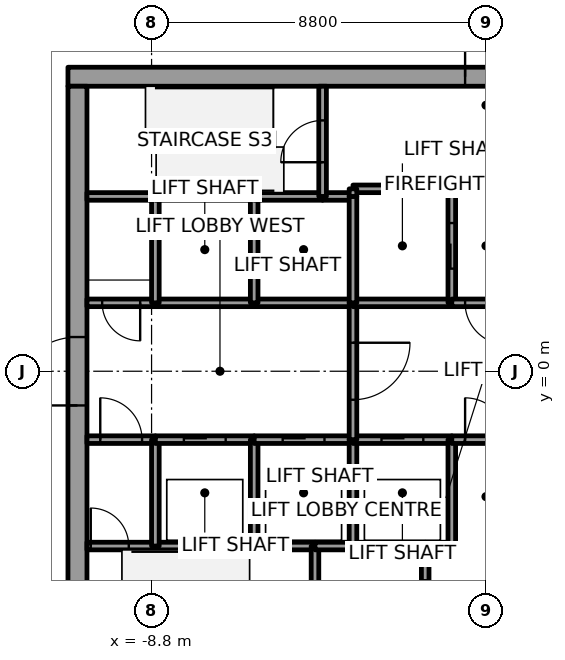
"""IFC4 building model, lengths in metres.
Left out: names, types, materials, properties, quantities, classifications, styles, units other than length and angle.
Written with IfcOpenShell. Run it as: python <this file> out.ifc"""

import sys

from ifc_helpers import new_model, si_unit, direction, frame, frame_2d, origin, place, context, subcontext, project, spatial, rectangle, extrude, element, fill, save


model = new_model("IFC4")
c1 = context("Model", 3, precision=1e-05, world=origin(), true_north=direction((0.0, 1.0)))
c2 = subcontext(c1, "Body", "Model", "MODEL_VIEW")
j1 = project(units=[si_unit("LENGTHUNIT", "METRE"), si_unit("PLANEANGLEUNIT", "RADIAN")], contexts=[c1])
p1 = place(None, origin())
s1 = spatial("IfcSite", under=j1, at=p1, CompositionType="ELEMENT")
p2 = place(p1, origin())
s2 = spatial("IfcBuilding", under=s1, at=p2, CompositionType="ELEMENT")
p3 = place(p2, frame((0.0, 0.0, 141.8)))
s3 = spatial("IfcBuildingStorey", under=s2, at=p3, CompositionType="ELEMENT", Elevation=141.8)
p4 = place(p3, frame((-11.0, 7.75, 0.0), z_axis=(0.0, 0.0, 1.0), x_axis=(1.0, 0.0, 0.0)))
e1 = element("IfcWall", 1, at=p4, inside=s3, PredefinedType="SHEAR", context=c2, shape_type="SweptSolid", body=[
    extrude(rectangle(XDim=22.0, YDim=0.5, at=frame_2d((11.0, 0.0))), origin(), (0.0, 0.0, 1.0), 4.0),
])
p5 = place(p4, frame((10.45, 0.0, 0.0)))
e2 = element("IfcOpeningElement", 2, at=p5, cuts=e1, PredefinedType="OPENING", context=c2, shape_type="SweptSolid", body=[
    extrude(rectangle(XDim=1.1, YDim=2.1, at=frame_2d((0.55, 1.05))), frame((0.0, 0.25, 0.0), z_axis=(0.0, -1.0, 0.0), x_axis=(1.0, 0.0, 0.0)), (0.0, 0.0, 1.0), 0.5),
])
p6 = place(p3, frame((-10.75, -7.5, 0.0), z_axis=(0.0, 0.0, 1.0), x_axis=(0.0, 1.0, 0.0)))
e3 = element("IfcWall", 3, at=p6, inside=s3, PredefinedType="SHEAR", context=c2, shape_type="SweptSolid", body=[
    extrude(rectangle(XDim=15.0, YDim=0.5, at=frame_2d((7.5, 0.0))), origin(), (0.0, 0.0, 1.0), 4.0),
])
p7 = place(p6, frame((6.6, 0.0, 0.0)))
e4 = element("IfcOpeningElement", 4, at=p7, cuts=e3, PredefinedType="OPENING", context=c2, shape_type="SweptSolid", body=[
    extrude(rectangle(XDim=1.8, YDim=2.1, at=frame_2d((0.9, 1.05))), frame((0.0, 0.25, 0.0), z_axis=(0.0, -1.0, 0.0), x_axis=(1.0, 0.0, 0.0)), (0.0, 0.0, 1.0), 0.5),
])
p8 = place(p3, frame((-10.5, -4.6, 0.0), z_axis=(0.0, 0.0, 1.0), x_axis=(1.0, 0.0, 0.0)))
e5 = element("IfcWall", 5, at=p8, inside=s3, PredefinedType="SOLIDWALL", context=c2, shape_type="SweptSolid", body=[
    extrude(rectangle(XDim=1.8, YDim=0.2, at=frame_2d((0.9, 0.0))), origin(), (0.0, 0.0, 1.0), 3.85),
])
p9 = place(p8, frame((0.1, 0.0, 0.0)))
e6 = element("IfcOpeningElement", 6, at=p9, cuts=e5, PredefinedType="OPENING", context=c2, shape_type="SweptSolid", body=[
    extrude(rectangle(XDim=1.0, YDim=2.1, at=frame_2d((0.5, 1.05))), frame((0.0, 0.1, 0.0), z_axis=(0.0, -1.0, 0.0), x_axis=(1.0, 0.0, 0.0)), (0.0, 0.0, 1.0), 0.2),
])
p10 = place(p3, frame((-10.5, -1.8, 0.0), z_axis=(0.0, 0.0, 1.0), x_axis=(1.0, 0.0, 0.0)))
e7 = element("IfcWall", 7, at=p10, inside=s3, PredefinedType="SOLIDWALL", context=c2, shape_type="SweptSolid", body=[
    extrude(rectangle(XDim=1.8, YDim=0.2, at=frame_2d((0.9, 0.0))), origin(), (0.0, 0.0, 1.0), 3.85),
])
p11 = place(p10, frame((0.35, 0.0, 0.0)))
e8 = element("IfcOpeningElement", 8, at=p11, cuts=e7, PredefinedType="OPENING", context=c2, shape_type="SweptSolid", body=[
    extrude(rectangle(XDim=1.1, YDim=2.1, at=frame_2d((0.55, 1.05))), frame((0.0, 0.1, 0.0), z_axis=(0.0, -1.0, 0.0), x_axis=(1.0, 0.0, 0.0)), (0.0, 0.0, 1.0), 0.2),
])
p12 = place(p3, frame((-8.7, 1.8, 0.0), z_axis=(0.0, 0.0, 1.0), x_axis=(-1.0, 0.0, 0.0)))
e9 = element("IfcWall", 9, at=p12, inside=s3, PredefinedType="SOLIDWALL", context=c2, shape_type="SweptSolid", body=[
    extrude(rectangle(XDim=1.8, YDim=0.2, at=frame_2d((0.9, 0.0))), origin(), (0.0, 0.0, 1.0), 3.85),
])
p13 = place(p12, frame((0.4, 0.0, 0.0)))
e10 = element("IfcOpeningElement", 10, at=p13, cuts=e9, PredefinedType="OPENING", context=c2, shape_type="SweptSolid", body=[
    extrude(rectangle(XDim=1.0, YDim=2.1, at=frame_2d((0.5, 1.05))), frame((0.0, 0.1, 0.0), z_axis=(0.0, -1.0, 0.0), x_axis=(1.0, 0.0, 0.0)), (0.0, 0.0, 1.0), 0.2),
])
p14 = place(p3, frame((-8.7, 4.6, 0.0), z_axis=(0.0, 0.0, 1.0), x_axis=(-1.0, 0.0, 0.0)))
e11 = element("IfcWall", 11, at=p14, inside=s3, PredefinedType="SOLIDWALL", context=c2, shape_type="SweptSolid", body=[
    extrude(rectangle(XDim=1.8, YDim=0.2, at=frame_2d((0.9, 0.0))), origin(), (0.0, 0.0, 1.0), 3.85),
])
p15 = place(p3, frame((-8.7, -4.6, 0.0), z_axis=(0.0, 0.0, 1.0), x_axis=(1.0, 0.0, 0.0)))
e12 = element("IfcWall", 12, at=p15, inside=s3, PredefinedType="SOLIDWALL", context=c2, shape_type="SweptSolid", body=[
    extrude(rectangle(XDim=2.6, YDim=0.2, at=frame_2d((1.3, 0.0))), origin(), (0.0, 0.0, 1.0), 3.85),
])
p16 = place(p3, frame((-8.7, -4.6, 0.0), z_axis=(0.0, 0.0, 1.0), x_axis=(0.0, 1.0, 0.0)))
e13 = element("IfcWall", 13, at=p16, inside=s3, PredefinedType="SOLIDWALL", context=c2, shape_type="SweptSolid", body=[
    extrude(rectangle(XDim=2.8, YDim=0.2, at=frame_2d((1.4, 0.0))), origin(), (0.0, 0.0, 1.0), 3.85),
])
p17 = place(p3, frame((-8.7, -1.8, 0.0), z_axis=(0.0, 0.0, 1.0), x_axis=(1.0, 0.0, 0.0)))
e14 = element("IfcWall", 14, at=p17, inside=s3, PredefinedType="SOLIDWALL", context=c2, shape_type="SweptSolid", body=[
    extrude(rectangle(XDim=2.6, YDim=0.2, at=frame_2d((1.3, 0.0))), origin(), (0.0, 0.0, 1.0), 3.85),
])
p18 = place(p17, frame((0.75, 0.0, 0.0)))
e15 = element("IfcOpeningElement", 15, at=p18, cuts=e14, PredefinedType="OPENING", context=c2, shape_type="SweptSolid", body=[
    extrude(rectangle(XDim=1.1, YDim=2.1, at=frame_2d((0.55, 1.05))), frame((0.0, 0.1, 0.0), z_axis=(0.0, -1.0, 0.0), x_axis=(1.0, 0.0, 0.0)), (0.0, 0.0, 1.0), 0.2),
])
p19 = place(p3, frame((-6.1, 1.8, 0.0), z_axis=(0.0, 0.0, 1.0), x_axis=(-1.0, 0.0, 0.0)))
e16 = element("IfcWall", 16, at=p19, inside=s3, PredefinedType="SOLIDWALL", context=c2, shape_type="SweptSolid", body=[
    extrude(rectangle(XDim=2.6, YDim=0.2, at=frame_2d((1.3, 0.0))), origin(), (0.0, 0.0, 1.0), 3.85),
])
p20 = place(p3, frame((-8.7, 1.8, 0.0), z_axis=(0.0, 0.0, 1.0), x_axis=(0.0, 1.0, 0.0)))
e17 = element("IfcWall", 17, at=p20, inside=s3, PredefinedType="SOLIDWALL", context=c2, shape_type="SweptSolid", body=[
    extrude(rectangle(XDim=2.8, YDim=0.2, at=frame_2d((1.4, 0.0))), origin(), (0.0, 0.0, 1.0), 3.85),
])
p21 = place(p3, frame((-6.1, 4.6, 0.0), z_axis=(0.0, 0.0, 1.0), x_axis=(-1.0, 0.0, 0.0)))
e18 = element("IfcWall", 18, at=p21, inside=s3, PredefinedType="SOLIDWALL", context=c2, shape_type="SweptSolid", body=[
    extrude(rectangle(XDim=2.6, YDim=0.2, at=frame_2d((1.3, 0.0))), origin(), (0.0, 0.0, 1.0), 3.85),
])
p22 = place(p3, frame((-6.1, -4.6, 0.0), z_axis=(0.0, 0.0, 1.0), x_axis=(1.0, 0.0, 0.0)))
e19 = element("IfcWall", 19, at=p22, inside=s3, PredefinedType="SOLIDWALL", context=c2, shape_type="SweptSolid", body=[
    extrude(rectangle(XDim=1.6, YDim=0.2, at=frame_2d((0.8, 0.0))), origin(), (0.0, 0.0, 1.0), 3.85),
])
p23 = place(p3, frame((-6.1, -4.6, 0.0), z_axis=(0.0, 0.0, 1.0), x_axis=(0.0, 1.0, 0.0)))
e20 = element("IfcWall", 20, at=p23, inside=s3, PredefinedType="SOLIDWALL", context=c2, shape_type="SweptSolid", body=[
    extrude(rectangle(XDim=2.8, YDim=0.2, at=frame_2d((1.4, 0.0))), origin(), (0.0, 0.0, 1.0), 3.85),
])
p24 = place(p3, frame((-6.1, -1.8, 0.0), z_axis=(0.0, 0.0, 1.0), x_axis=(1.0, 0.0, 0.0)))
e21 = element("IfcWall", 21, at=p24, inside=s3, PredefinedType="SOLIDWALL", context=c2, shape_type="SweptSolid", body=[
    extrude(rectangle(XDim=2.6, YDim=0.2, at=frame_2d((1.3, 0.0))), origin(), (0.0, 0.0, 1.0), 3.85),
])
p25 = place(p24, frame((0.75, 0.0, 0.0)))
e22 = element("IfcOpeningElement", 22, at=p25, cuts=e21, PredefinedType="OPENING", context=c2, shape_type="SweptSolid", body=[
    extrude(rectangle(XDim=1.1, YDim=2.1, at=frame_2d((0.55, 1.05))), frame((0.0, 0.1, 0.0), z_axis=(0.0, -1.0, 0.0), x_axis=(1.0, 0.0, 0.0)), (0.0, 0.0, 1.0), 0.2),
])
p26 = place(p3, frame((-3.5, 1.8, 0.0), z_axis=(0.0, 0.0, 1.0), x_axis=(-1.0, 0.0, 0.0)))
e23 = element("IfcWall", 23, at=p26, inside=s3, PredefinedType="SOLIDWALL", context=c2, shape_type="SweptSolid", body=[
    extrude(rectangle(XDim=2.6, YDim=0.2, at=frame_2d((1.3, 0.0))), origin(), (0.0, 0.0, 1.0), 3.85),
])
p27 = place(p3, frame((-6.1, 1.8, 0.0), z_axis=(0.0, 0.0, 1.0), x_axis=(0.0, 1.0, 0.0)))
e24 = element("IfcWall", 24, at=p27, inside=s3, PredefinedType="SOLIDWALL", context=c2, shape_type="SweptSolid", body=[
    extrude(rectangle(XDim=2.8, YDim=0.2, at=frame_2d((1.4, 0.0))), origin(), (0.0, 0.0, 1.0), 3.85),
])
p28 = place(p3, frame((-4.3, 4.6, 0.0), z_axis=(0.0, 0.0, 1.0), x_axis=(-1.0, 0.0, 0.0)))
e25 = element("IfcWall", 25, at=p28, inside=s3, PredefinedType="SOLIDWALL", context=c2, shape_type="SweptSolid", body=[
    extrude(rectangle(XDim=1.8, YDim=0.2, at=frame_2d((0.9, 0.0))), origin(), (0.0, 0.0, 1.0), 3.85),
])
p29 = place(p3, frame((-4.5, -4.6, 0.0), z_axis=(0.0, 0.0, 1.0), x_axis=(0.0, -1.0, 0.0)))
e26 = element("IfcWall", 26, at=p29, inside=s3, PredefinedType="SOLIDWALL", context=c2, shape_type="SweptSolid", body=[
    extrude(rectangle(XDim=2.9, YDim=0.2, at=frame_2d((1.45, 0.0))), origin(), (0.0, 0.0, 1.0), 3.85),
])
p30 = place(p3, frame((-4.5, -4.6, 0.0), z_axis=(0.0, 0.0, 1.0), x_axis=(1.0, 0.0, 0.0)))
e27 = element("IfcWall", 27, at=p30, inside=s3, PredefinedType="SOLIDWALL", context=c2, shape_type="SweptSolid", body=[
    extrude(rectangle(XDim=1.0, YDim=0.2, at=frame_2d((0.5, 0.0))), origin(), (0.0, 0.0, 1.0), 3.85),
])
p31 = place(p3, frame((-3.5, 4.6, 0.0), z_axis=(0.0, 0.0, 1.0), x_axis=(-1.0, 0.0, 0.0)))
e28 = element("IfcWall", 28, at=p31, inside=s3, PredefinedType="SOLIDWALL", context=c2, shape_type="SweptSolid", body=[
    extrude(rectangle(XDim=0.8, YDim=0.2, at=frame_2d((0.4, 0.0))), origin(), (0.0, 0.0, 1.0), 3.85),
])
p32 = place(p3, frame((-4.3, 4.6, 0.0), z_axis=(0.0, 0.0, 1.0), x_axis=(0.0, 1.0, 0.0)))
e29 = element("IfcWall", 29, at=p32, inside=s3, PredefinedType="SOLIDWALL", context=c2, shape_type="SweptSolid", body=[
    extrude(rectangle(XDim=2.9, YDim=0.2, at=frame_2d((1.45, 0.0))), origin(), (0.0, 0.0, 1.0), 3.85),
])
p33 = place(p32, frame((0.9, 0.0, 0.0)))
e30 = element("IfcOpeningElement", 30, at=p33, cuts=e29, PredefinedType="OPENING", context=c2, shape_type="SweptSolid", body=[
    extrude(rectangle(XDim=1.1, YDim=2.1, at=frame_2d((0.55, 1.05))), frame((0.0, 0.1, 0.0), z_axis=(0.0, -1.0, 0.0), x_axis=(1.0, 0.0, 0.0)), (0.0, 0.0, 1.0), 0.2),
])
p34 = place(p3, frame((-3.5, -4.6, 0.0), z_axis=(0.0, 0.0, 1.0), x_axis=(1.0, 0.0, 0.0)))
e31 = element("IfcWall", 31, at=p34, inside=s3, PredefinedType="SOLIDWALL", context=c2, shape_type="SweptSolid", body=[
    extrude(rectangle(XDim=1.9, YDim=0.2, at=frame_2d((0.95, 0.0))), origin(), (0.0, 0.0, 1.0), 3.85),
])
p35 = place(p3, frame((-3.5, -4.6, 0.0), z_axis=(0.0, 0.0, 1.0), x_axis=(0.0, 1.0, 0.0)))
e32 = element("IfcWall", 32, at=p35, inside=s3, PredefinedType="SOLIDWALL", context=c2, shape_type="SweptSolid", body=[
    extrude(rectangle(XDim=2.8, YDim=0.2, at=frame_2d((1.4, 0.0))), origin(), (0.0, 0.0, 1.0), 3.85),
])
p36 = place(p3, frame((-3.5, -1.8, 0.0), z_axis=(0.0, 0.0, 1.0), x_axis=(1.0, 0.0, 0.0)))
e33 = element("IfcWall", 33, at=p36, inside=s3, PredefinedType="SOLIDWALL", context=c2, shape_type="SweptSolid", body=[
    extrude(rectangle(XDim=2.6, YDim=0.2, at=frame_2d((1.3, 0.0))), origin(), (0.0, 0.0, 1.0), 3.85),
])
p37 = place(p36, frame((0.75, 0.0, 0.0)))
e34 = element("IfcOpeningElement", 34, at=p37, cuts=e33, PredefinedType="OPENING", context=c2, shape_type="SweptSolid", body=[
    extrude(rectangle(XDim=1.1, YDim=2.1, at=frame_2d((0.55, 1.05))), frame((0.0, 0.1, 0.0), z_axis=(0.0, -1.0, 0.0), x_axis=(1.0, 0.0, 0.0)), (0.0, 0.0, 1.0), 0.2),
])
p38 = place(p3, frame((-3.5, 1.8, 0.0), z_axis=(0.0, 0.0, 1.0), x_axis=(0.0, -1.0, 0.0)))
e35 = element("IfcWall", 35, at=p38, inside=s3, PredefinedType="SOLIDWALL", context=c2, shape_type="SweptSolid", body=[
    extrude(rectangle(XDim=3.6, YDim=0.2, at=frame_2d((1.8, 0.0))), origin(), (0.0, 0.0, 1.0), 3.85),
])
p39 = place(p38, frame((1.05, 0.0, 0.0)))
e36 = element("IfcOpeningElement", 36, at=p39, cuts=e35, PredefinedType="OPENING", context=c2, shape_type="SweptSolid", body=[
    extrude(rectangle(XDim=1.5, YDim=2.1, at=frame_2d((0.75, 1.05))), frame((0.0, 0.1, 0.0), z_axis=(0.0, -1.0, 0.0), x_axis=(1.0, 0.0, 0.0)), (0.0, 0.0, 1.0), 0.2),
])
p40 = place(p3, frame((-0.9, 1.8, 0.0), z_axis=(0.0, 0.0, 1.0), x_axis=(-1.0, 0.0, 0.0)))
e37 = element("IfcWall", 37, at=p40, inside=s3, PredefinedType="SOLIDWALL", context=c2, shape_type="SweptSolid", body=[
    extrude(rectangle(XDim=2.6, YDim=0.2, at=frame_2d((1.3, 0.0))), origin(), (0.0, 0.0, 1.0), 3.85),
])
p41 = place(p3, frame((-3.5, 4.6, 0.0), z_axis=(0.0, 0.0, 1.0), x_axis=(0.0, -1.0, 0.0)))
e38 = element("IfcWall", 38, at=p41, inside=s3, PredefinedType="SOLIDWALL", context=c2, shape_type="SweptSolid", body=[
    extrude(rectangle(XDim=2.8, YDim=0.2, at=frame_2d((1.4, 0.0))), origin(), (0.0, 0.0, 1.0), 3.85),
])
p42 = place(p3, frame((-0.9, 1.8, 0.0), z_axis=(0.0, 0.0, 1.0), x_axis=(0.0, 1.0, 0.0)))
e39 = element("IfcWall", 39, at=p42, inside=s3, PredefinedType="SOLIDWALL", context=c2, shape_type="SweptSolid", body=[
    extrude(rectangle(XDim=3.0, YDim=0.2, at=frame_2d((1.5, 0.0))), origin(), (0.0, 0.0, 1.0), 3.85),
])
p43 = place(p42, frame((0.9, 0.0, 0.0)))
e40 = element("IfcOpeningElement", 40, at=p43, cuts=e39, PredefinedType="OPENING", context=c2, shape_type="SweptSolid", body=[
    extrude(rectangle(XDim=1.2, YDim=2.1, at=frame_2d((0.6, 1.05))), frame((0.0, 0.1, 0.0), z_axis=(0.0, -1.0, 0.0), x_axis=(1.0, 0.0, 0.0)), (0.0, 0.0, 1.0), 0.2),
])
p44 = place(p3, frame((-0.9, 4.8, 0.0), z_axis=(0.0, 0.0, 1.0), x_axis=(-1.0, 0.0, 0.0)))
e41 = element("IfcWall", 41, at=p44, inside=s3, PredefinedType="SOLIDWALL", context=c2, shape_type="SweptSolid", body=[
    extrude(rectangle(XDim=2.6, YDim=0.2, at=frame_2d((1.3, 0.0))), origin(), (0.0, 0.0, 1.0), 3.85),
])
p45 = place(p3, frame((-3.5, 4.8, 0.0), z_axis=(0.0, 0.0, 1.0), x_axis=(0.0, -1.0, 0.0)))
e42 = element("IfcWall", 42, at=p45, inside=s3, PredefinedType="SOLIDWALL", context=c2, shape_type="SweptSolid", body=[
    extrude(rectangle(XDim=0.2, YDim=0.2, at=frame_2d((0.1, 0.0))), origin(), (0.0, 0.0, 1.0), 3.85),
])
p46 = place(p3, frame((-1.6, -7.5, 0.0), z_axis=(0.0, 0.0, 1.0), x_axis=(0.0, 1.0, 0.0)))
e43 = element("IfcWall", 43, at=p46, inside=s3, PredefinedType="SOLIDWALL", context=c2, shape_type="SweptSolid", body=[
    extrude(rectangle(XDim=2.9, YDim=0.2, at=frame_2d((1.45, 0.0))), origin(), (0.0, 0.0, 1.0), 3.85),
])
p47 = place(p46, frame((0.9, 0.0, 0.0)))
e44 = element("IfcOpeningElement", 44, at=p47, cuts=e43, PredefinedType="OPENING", context=c2, shape_type="SweptSolid", body=[
    extrude(rectangle(XDim=1.1, YDim=2.1, at=frame_2d((0.55, 1.05))), frame((0.0, 0.1, 0.0), z_axis=(0.0, -1.0, 0.0), x_axis=(1.0, 0.0, 0.0)), (0.0, 0.0, 1.0), 0.2),
])
p48 = place(p3, frame((-1.6, -4.6, 0.0), z_axis=(0.0, 0.0, 1.0), x_axis=(1.0, 0.0, 0.0)))
e45 = element("IfcWall", 45, at=p48, inside=s3, PredefinedType="SOLIDWALL", context=c2, shape_type="SweptSolid", body=[
    extrude(rectangle(XDim=0.7, YDim=0.2, at=frame_2d((0.35, 0.0))), origin(), (0.0, 0.0, 1.0), 3.85),
])
p49 = place(p3, frame((-0.9, -4.6, 0.0), z_axis=(0.0, 0.0, 1.0), x_axis=(0.0, 1.0, 0.0)))
e46 = element("IfcWall", 46, at=p49, inside=s3, PredefinedType="SOLIDWALL", context=c2, shape_type="SweptSolid", body=[
    extrude(rectangle(XDim=2.8, YDim=0.2, at=frame_2d((1.4, 0.0))), origin(), (0.0, 0.0, 1.0), 3.85),
])
p50 = place(p3, frame((-0.9, -1.8, 0.0), z_axis=(0.0, 0.0, 1.0), x_axis=(1.0, 0.0, 0.0)))
e47 = element("IfcWall", 47, at=p50, inside=s3, PredefinedType="SOLIDWALL", context=c2, shape_type="SweptSolid", body=[
    extrude(rectangle(XDim=1.8, YDim=0.2, at=frame_2d((0.9, 0.0))), origin(), (0.0, 0.0, 1.0), 3.85),
])
p51 = place(p50, frame((0.35, 0.0, 0.0)))
e48 = element("IfcOpeningElement", 48, at=p51, cuts=e47, PredefinedType="OPENING", context=c2, shape_type="SweptSolid", body=[
    extrude(rectangle(XDim=1.1, YDim=2.1, at=frame_2d((0.55, 1.05))), frame((0.0, 0.1, 0.0), z_axis=(0.0, -1.0, 0.0), x_axis=(1.0, 0.0, 0.0)), (0.0, 0.0, 1.0), 0.2),
])
p52 = place(p3, frame((0.9, 1.8, 0.0), z_axis=(0.0, 0.0, 1.0), x_axis=(-1.0, 0.0, 0.0)))
e49 = element("IfcWall", 49, at=p52, inside=s3, PredefinedType="SOLIDWALL", context=c2, shape_type="SweptSolid", body=[
    extrude(rectangle(XDim=1.8, YDim=0.2, at=frame_2d((0.9, 0.0))), origin(), (0.0, 0.0, 1.0), 3.85),
])
p53 = place(p52, frame((0.35, 0.0, 0.0)))
e50 = element("IfcOpeningElement", 50, at=p53, cuts=e49, PredefinedType="OPENING", context=c2, shape_type="SweptSolid", body=[
    extrude(rectangle(XDim=1.1, YDim=2.1, at=frame_2d((0.55, 1.05))), frame((0.0, 0.1, 0.0), z_axis=(0.0, -1.0, 0.0), x_axis=(1.0, 0.0, 0.0)), (0.0, 0.0, 1.0), 0.2),
])
p54 = place(p18, origin())
e51 = element("IfcDoor", 51, at=p54, inside=s3, OperationType="SLIDING_TO_RIGHT", PredefinedType="DOOR", context=c2, shape_type="SweptSolid", body=[
    extrude(rectangle(XDim=1.1, YDim=2.1, at=frame_2d((0.55, 1.05))), frame((0.0, 0.025, 0.0), z_axis=(0.0, -1.0, 0.0), x_axis=(1.0, 0.0, 0.0)), (0.0, 0.0, 1.0), 0.05),
])
fill(e15, e51)
p55 = place(p25, origin())
e52 = element("IfcDoor", 52, at=p55, inside=s3, OperationType="SLIDING_TO_RIGHT", PredefinedType="DOOR", context=c2, shape_type="SweptSolid", body=[
    extrude(rectangle(XDim=1.1, YDim=2.1, at=frame_2d((0.55, 1.05))), frame((0.0, 0.025, 0.0), z_axis=(0.0, -1.0, 0.0), x_axis=(1.0, 0.0, 0.0)), (0.0, 0.0, 1.0), 0.05),
])
fill(e22, e52)
p56 = place(p37, origin())
e53 = element("IfcDoor", 53, at=p56, inside=s3, OperationType="SLIDING_TO_LEFT", PredefinedType="DOOR", context=c2, shape_type="SweptSolid", body=[
    extrude(rectangle(XDim=1.1, YDim=2.1, at=frame_2d((0.55, 1.05))), frame((0.0, 0.025, 0.0), z_axis=(0.0, -1.0, 0.0), x_axis=(1.0, 0.0, 0.0)), (0.0, 0.0, 1.0), 0.05),
])
fill(e34, e53)
p57 = place(p43, origin())
e54 = element("IfcDoor", 54, at=p57, inside=s3, OperationType="SLIDING_TO_LEFT", PredefinedType="DOOR", context=c2, shape_type="SweptSolid", body=[
    extrude(rectangle(XDim=1.2, YDim=2.1, at=frame_2d((0.6, 1.05))), frame((0.0, 0.025, 0.0), z_axis=(0.0, -1.0, 0.0), x_axis=(1.0, 0.0, 0.0)), (0.0, 0.0, 1.0), 0.05),
])
fill(e40, e54)
p58 = place(p39, origin())
e55 = element("IfcDoor", 55, at=p58, inside=s3, OperationType="DOUBLE_DOOR_SINGLE_SWING", PredefinedType="DOOR", context=c2, shape_type="SweptSolid", body=[
    extrude(rectangle(XDim=1.5, YDim=2.1, at=frame_2d((0.75, 1.05))), frame((0.0, 0.025, 0.0), z_axis=(0.0, -1.0, 0.0), x_axis=(1.0, 0.0, 0.0)), (0.0, 0.0, 1.0), 0.05),
])
fill(e36, e55)
p59 = place(p11, origin())
e56 = element("IfcDoor", 56, at=p59, inside=s3, OperationType="SINGLE_SWING_LEFT", PredefinedType="DOOR", context=c2, shape_type="SweptSolid", body=[
    extrude(rectangle(XDim=1.1, YDim=2.1, at=frame_2d((0.55, 1.05))), frame((0.0, 0.025, 0.0), z_axis=(0.0, -1.0, 0.0), x_axis=(1.0, 0.0, 0.0)), (0.0, 0.0, 1.0), 0.05),
])
fill(e8, e56)
p60 = place(p53, origin())
e57 = element("IfcDoor", 57, at=p60, inside=s3, OperationType="SINGLE_SWING_RIGHT", PredefinedType="DOOR", context=c2, shape_type="SweptSolid", body=[
    extrude(rectangle(XDim=1.1, YDim=2.1, at=frame_2d((0.55, 1.05))), frame((0.0, 0.025, 0.0), z_axis=(0.0, -1.0, 0.0), x_axis=(1.0, 0.0, 0.0)), (0.0, 0.0, 1.0), 0.05),
])
fill(e50, e57)
p61 = place(p51, origin())
e58 = element("IfcDoor", 58, at=p61, inside=s3, OperationType="SINGLE_SWING_LEFT", PredefinedType="DOOR", context=c2, shape_type="SweptSolid", body=[
    extrude(rectangle(XDim=1.1, YDim=2.1, at=frame_2d((0.55, 1.05))), frame((0.0, 0.025, 0.0), z_axis=(0.0, -1.0, 0.0), x_axis=(1.0, 0.0, 0.0)), (0.0, 0.0, 1.0), 0.05),
])
fill(e48, e58)
p62 = place(p13, origin())
e59 = element("IfcDoor", 59, at=p62, inside=s3, OperationType="SINGLE_SWING_LEFT", PredefinedType="DOOR", context=c2, shape_type="SweptSolid", body=[
    extrude(rectangle(XDim=1.0, YDim=2.1, at=frame_2d((0.5, 1.05))), frame((0.0, 0.025, 0.0), z_axis=(0.0, -1.0, 0.0), x_axis=(1.0, 0.0, 0.0)), (0.0, 0.0, 1.0), 0.05),
])
fill(e10, e59)
p63 = place(p9, origin())
e60 = element("IfcDoor", 60, at=p63, inside=s3, OperationType="SINGLE_SWING_LEFT", PredefinedType="DOOR", context=c2, shape_type="SweptSolid", body=[
    extrude(rectangle(XDim=1.0, YDim=2.1, at=frame_2d((0.5, 1.05))), frame((0.0, 0.025, 0.0), z_axis=(0.0, -1.0, 0.0), x_axis=(1.0, 0.0, 0.0)), (0.0, 0.0, 1.0), 0.05),
])
fill(e6, e60)
p64 = place(p33, origin())
e61 = element("IfcDoor", 61, at=p64, inside=s3, OperationType="SINGLE_SWING_RIGHT", PredefinedType="DOOR", context=c2, shape_type="SweptSolid", body=[
    extrude(rectangle(XDim=1.1, YDim=2.1, at=frame_2d((0.55, 1.05))), frame((0.0, 0.025, 0.0), z_axis=(0.0, -1.0, 0.0), x_axis=(1.0, 0.0, 0.0)), (0.0, 0.0, 1.0), 0.05),
])
fill(e30, e61)
p65 = place(p7, origin())
e62 = element("IfcDoor", 62, at=p65, inside=s3, OperationType="DOUBLE_DOOR_SINGLE_SWING", PredefinedType="DOOR", context=c2, shape_type="SweptSolid", body=[
    extrude(rectangle(XDim=1.8, YDim=2.1, at=frame_2d((0.9, 1.05))), frame((0.0, 0.025, 0.0), z_axis=(0.0, -1.0, 0.0), x_axis=(1.0, 0.0, 0.0)), (0.0, 0.0, 1.0), 0.05),
])
fill(e4, e62)
p66 = place(p5, origin())
e63 = element("IfcDoor", 63, at=p66, inside=s3, OperationType="SINGLE_SWING_RIGHT", PredefinedType="DOOR", context=c2, shape_type="SweptSolid", body=[
    extrude(rectangle(XDim=1.1, YDim=2.1, at=frame_2d((0.55, 1.05))), frame((0.0, 0.025, 0.0), z_axis=(0.0, -1.0, 0.0), x_axis=(1.0, 0.0, 0.0)), (0.0, 0.0, 1.0), 0.05),
])
fill(e2, e63)
save(model, sys.argv[1])
